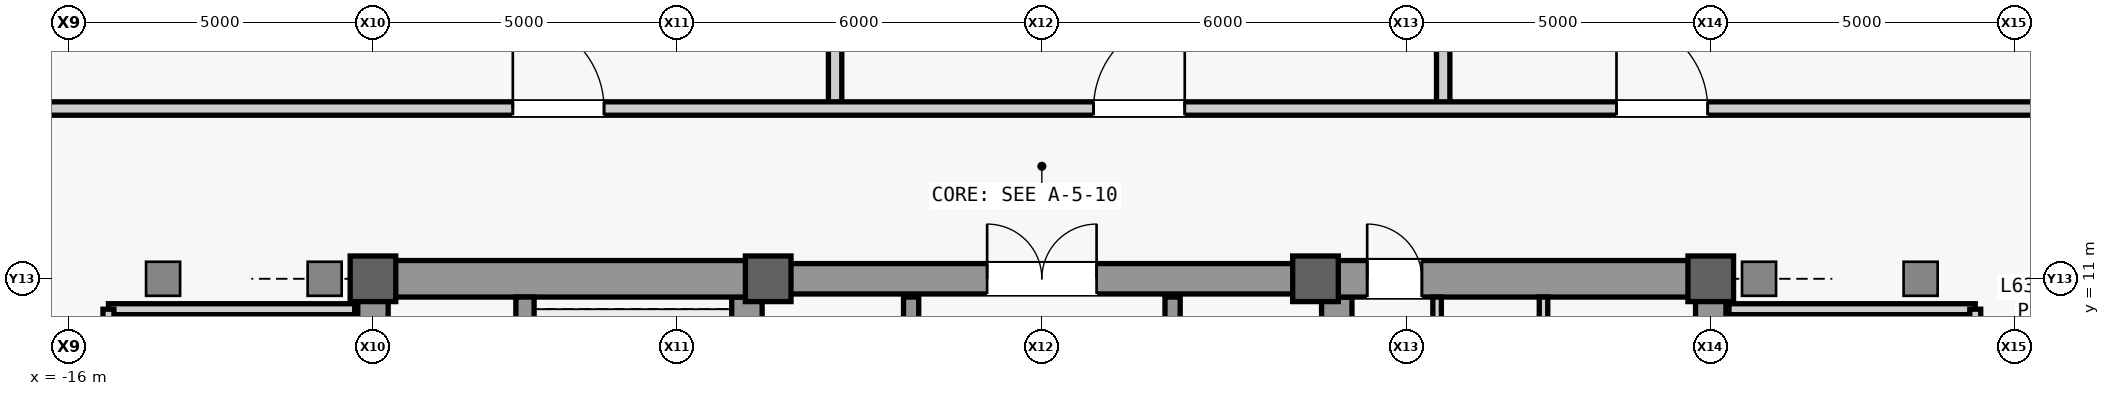
"""IFC4 building model, lengths in metres.
Left out: names, types, materials, properties, quantities, classifications, styles, units other than length and angle.
Written with IfcOpenShell. Run it as: python <this file> out.ifc"""

import sys

from ifc_helpers import new_model, si_unit, direction, frame, frame_2d, origin, origin_2d, place, context, subcontext, project, spatial, rectangle, extrude, source, transform, mapped, element, fill, save


model = new_model("IFC4")
c1 = context("Model", 3, precision=1e-05, world=origin(), true_north=direction((0.0, 1.0)))
c2 = subcontext(c1, "Body", "Model", "MODEL_VIEW")
j1 = project(units=[si_unit("LENGTHUNIT", "METRE"), si_unit("PLANEANGLEUNIT", "RADIAN")], contexts=[c1])
p1 = place(None, origin())
s1 = spatial("IfcSite", under=j1, at=p1, CompositionType="ELEMENT")
p2 = place(p1, origin())
s2 = spatial("IfcBuilding", under=s1, at=p2, CompositionType="ELEMENT")
p3 = place(p2, frame((0.0, 0.0, 268.3)))
s3 = spatial("IfcBuildingStorey", under=s2, at=p3, CompositionType="ELEMENT", Elevation=268.3)
m1 = source(origin(), c2, "Body", "SweptSolid", [
    extrude(rectangle(XDim=22.0, YDim=0.5, at=frame_2d((11.0, 0.0))), origin(), (0.0, 0.0, 1.0), 4.98),
])
p4 = place(p3, frame((-11.0, -11.0, 0.0), z_axis=(0.0, 0.0, 1.0), x_axis=(0.0, 1.0, 0.0)))
e1 = element("IfcWall", 1, at=p4, inside=s3, PredefinedType="SHEAR", context=c2, shape_type="MappedRepresentation", body=[
    mapped(m1, transform((0.0, 0.0, 0.0), scale=1.0)),
])
m2 = source(origin(), c2, "Body", "SweptSolid", [
    extrude(rectangle(XDim=1.1, YDim=2.2, at=frame_2d((0.55, 1.1))), frame((0.0, 0.26, 0.0), z_axis=(0.0, -1.0, 0.0), x_axis=(1.0, 0.0, 0.0)), (0.0, 0.0, 1.0), 0.52),
])
p5 = place(p4, frame((0.8, 0.0, 0.0)))
e2 = element("IfcOpeningElement", 2, at=p5, cuts=e1, PredefinedType="OPENING", context=c2, shape_type="MappedRepresentation", body=[
    mapped(m2, transform((0.0, 0.0, 0.0), scale=1.0)),
])
p6 = place(p4, frame((12.5, 0.0, 0.0)))
e3 = element("IfcOpeningElement", 3, at=p6, cuts=e1, PredefinedType="OPENING", context=c2, shape_type="MappedRepresentation", body=[
    mapped(m2, transform((0.0, 0.0, 0.0), scale=1.0)),
])
m3 = source(origin(), c2, "Body", "SweptSolid", [
    extrude(rectangle(XDim=0.9, YDim=2.15, at=frame_2d((0.45, 1.075))), frame((0.0, 0.26, 0.0), z_axis=(0.0, -1.0, 0.0), x_axis=(1.0, 0.0, 0.0)), (0.0, 0.0, 1.0), 0.52),
])
p7 = place(p4, frame((7.575, 0.0, 0.0)))
e4 = element("IfcOpeningElement", 4, at=p7, cuts=e1, PredefinedType="OPENING", context=c2, shape_type="MappedRepresentation", body=[
    mapped(m3, transform((0.0, 0.0, 0.0), scale=1.0)),
])
m4 = source(origin(), c2, "Body", "SweptSolid", [
    extrude(rectangle(XDim=1.3, YDim=2.3, at=frame_2d((0.65, 1.15))), frame((0.0, 0.26, 0.0), z_axis=(0.0, -1.0, 0.0), x_axis=(1.0, 0.0, 0.0)), (0.0, 0.0, 1.0), 0.52),
])
p8 = place(p4, frame((2.7, 0.0, 0.0)))
e5 = element("IfcOpeningElement", 5, at=p8, cuts=e1, PredefinedType="OPENING", context=c2, shape_type="MappedRepresentation", body=[
    mapped(m4, transform((0.0, 0.0, 0.0), scale=1.0)),
])
p9 = place(p3, frame((11.0, -11.0, 0.0), z_axis=(0.0, 0.0, 1.0), x_axis=(0.0, 1.0, 0.0)))
e6 = element("IfcWall", 6, at=p9, inside=s3, PredefinedType="SHEAR", context=c2, shape_type="MappedRepresentation", body=[
    mapped(m1, transform((0.0, 0.0, 0.0), scale=1.0)),
])
p10 = place(p9, frame((0.8, 0.0, 0.0)))
e7 = element("IfcOpeningElement", 7, at=p10, cuts=e6, PredefinedType="OPENING", context=c2, shape_type="MappedRepresentation", body=[
    mapped(m2, transform((0.0, 0.0, 0.0), scale=1.0)),
])
p11 = place(p9, frame((7.575, 0.0, 0.0)))
e8 = element("IfcOpeningElement", 8, at=p11, cuts=e6, PredefinedType="OPENING", context=c2, shape_type="MappedRepresentation", body=[
    mapped(m3, transform((0.0, 0.0, 0.0), scale=1.0)),
])
p12 = place(p9, frame((2.7, 0.0, 0.0)))
e9 = element("IfcOpeningElement", 9, at=p12, cuts=e6, PredefinedType="OPENING", context=c2, shape_type="MappedRepresentation", body=[
    mapped(m4, transform((0.0, 0.0, 0.0), scale=1.0)),
])
p13 = place(p9, frame((13.35, 0.0, 0.0)))
e10 = element("IfcOpeningElement", 10, at=p13, cuts=e6, PredefinedType="OPENING", context=c2, shape_type="MappedRepresentation", body=[
    mapped(m4, transform((0.0, 0.0, 0.0), scale=1.0)),
])
m5 = source(origin(), c2, "Body", "SweptSolid", [
    extrude(rectangle(XDim=21.4, YDim=0.5, at=frame_2d((10.7, 0.0))), origin(), (0.0, 0.0, 1.0), 4.98),
])
for number, where, z_axis, x_axis in (
    (11, (-4.85, -10.7, 0.0), (0.0, 0.0, 1.0), (0.0, 1.0, 0.0)),
    (12, (4.85, -10.7, 0.0), (0.0, 0.0, 1.0), (0.0, 1.0, 0.0)),
):
    element("IfcWall", number, at=place(p3, frame(where, z_axis=z_axis, x_axis=x_axis)), inside=s3, PredefinedType="SHEAR", context=c2, shape_type="MappedRepresentation", body=[
        mapped(m5, transform((0.0, 0.0, 0.0), scale=1.0)),
    ])
m6 = source(origin(), c2, "Body", "SweptSolid", [
    extrude(rectangle(XDim=5.9, YDim=0.6, at=frame_2d((2.95, 0.0))), origin(), (0.0, 0.0, 1.0), 4.98),
])
p14 = place(p3, frame((-10.75, 11.0, 0.0), z_axis=(0.0, 0.0, 1.0), x_axis=(1.0, 0.0, 0.0)))
e13 = element("IfcWall", 13, at=p14, inside=s3, PredefinedType="SHEAR", context=c2, shape_type="MappedRepresentation", body=[
    mapped(m6, transform((0.0, 0.0, 0.0), scale=1.0)),
])
p15 = place(p3, frame((4.85, 11.0, 0.0), z_axis=(0.0, 0.0, 1.0), x_axis=(1.0, 0.0, 0.0)))
e14 = element("IfcWall", 14, at=p15, inside=s3, PredefinedType="SHEAR", context=c2, shape_type="MappedRepresentation", body=[
    mapped(m6, transform((0.0, 0.0, 0.0), scale=1.0)),
])
m7 = source(origin(), c2, "Body", "SweptSolid", [
    extrude(rectangle(XDim=0.9, YDim=2.15, at=frame_2d((0.45, 1.075))), frame((0.0, 0.31, 0.0), z_axis=(0.0, -1.0, 0.0), x_axis=(1.0, 0.0, 0.0)), (0.0, 0.0, 1.0), 0.62),
])
p16 = place(p15, frame((0.5, 0.0, 0.0)))
e15 = element("IfcOpeningElement", 15, at=p16, cuts=e14, PredefinedType="OPENING", context=c2, shape_type="MappedRepresentation", body=[
    mapped(m7, transform((0.0, 0.0, 0.0), scale=1.0)),
])
m8 = source(origin(), c2, "Body", "SweptSolid", [
    extrude(rectangle(XDim=9.2, YDim=0.5, at=frame_2d((4.6, 0.0))), origin(), (0.0, 0.0, 1.0), 4.98),
])
p17 = place(p3, frame((-4.6, 11.0, 0.0), z_axis=(0.0, 0.0, 1.0), x_axis=(1.0, 0.0, 0.0)))
e16 = element("IfcWall", 16, at=p17, inside=s3, PredefinedType="SHEAR", context=c2, shape_type="MappedRepresentation", body=[
    mapped(m8, transform((0.0, 0.0, 0.0), scale=1.0)),
])
m9 = source(origin(), c2, "Body", "SweptSolid", [
    extrude(rectangle(XDim=1.8, YDim=2.25, at=frame_2d((0.9, 1.125))), frame((0.0, 0.26, 0.0), z_axis=(0.0, -1.0, 0.0), x_axis=(1.0, 0.0, 0.0)), (0.0, 0.0, 1.0), 0.52),
])
p18 = place(p17, frame((3.7, 0.0, 0.0)))
e17 = element("IfcOpeningElement", 17, at=p18, cuts=e16, PredefinedType="OPENING", context=c2, shape_type="MappedRepresentation", body=[
    mapped(m9, transform((0.0, 0.0, 0.0), scale=1.0)),
])
m10 = source(origin(), c2, "Body", "SweptSolid", [
    extrude(rectangle(XDim=0.75, YDim=0.75, at=origin_2d()), origin(), (0.0, 0.0, 1.0), 5.2),
])
for number, where, z_axis, x_axis in (
    (18, (-11.0, 11.0, 0.0), (0.0, 0.0, 1.0), (1.0, 0.0, 0.0)),
    (19, (-4.5, 11.0, 0.0), (0.0, 0.0, 1.0), (1.0, 0.0, 0.0)),
    (20, (4.5, 11.0, 0.0), (0.0, 0.0, 1.0), (1.0, 0.0, 0.0)),
    (21, (11.0, 11.0, 0.0), (0.0, 0.0, 1.0), (1.0, 0.0, 0.0)),
):
    element("IfcColumn", number, at=place(p3, frame(where, z_axis=z_axis, x_axis=x_axis)), inside=s3, PredefinedType="COLUMN", context=c2, shape_type="MappedRepresentation", body=[
        mapped(m10, transform((0.0, 0.0, 0.0), scale=1.0)),
    ])
m11 = source(origin(), c2, "Body", "SweptSolid", [
    extrude(rectangle(XDim=7.75, YDim=0.3, at=frame_2d((3.875, 0.0))), origin(), (0.0, 0.0, 1.0), 4.98),
])
p19 = place(p3, frame((-8.5, 2.95, 0.0), z_axis=(0.0, 0.0, 1.0), x_axis=(0.0, 1.0, 0.0)))
e22 = element("IfcWall", 22, at=p19, inside=s3, PredefinedType="SHEAR", context=c2, shape_type="MappedRepresentation", body=[
    mapped(m11, transform((0.0, 0.0, 0.0), scale=1.0)),
])
m12 = source(origin(), c2, "Body", "SweptSolid", [
    extrude(rectangle(XDim=9.4, YDim=0.14, at=frame_2d((4.7, 0.0))), origin(), (0.0, 0.0, 1.0), 4.98),
])
p20 = place(p3, frame((8.25, 1.3, 0.0), z_axis=(0.0, 0.0, 1.0), x_axis=(0.0, 1.0, 0.0)))
e23 = element("IfcWall", 23, at=p20, inside=s3, PredefinedType="PARTITIONING", context=c2, shape_type="MappedRepresentation", body=[
    mapped(m12, transform((0.0, 0.0, 0.0), scale=1.0)),
])
m13 = source(origin(), c2, "Body", "SweptSolid", [
    extrude(rectangle(XDim=5.7, YDim=0.14, at=frame_2d((2.85, 0.0))), origin(), (0.0, 0.0, 1.0), 4.98),
])
p21 = place(p3, frame((6.5, 5.0, 0.0), z_axis=(0.0, 0.0, 1.0), x_axis=(0.0, 1.0, 0.0)))
e24 = element("IfcWall", 24, at=p21, inside=s3, PredefinedType="PARTITIONING", context=c2, shape_type="MappedRepresentation", body=[
    mapped(m13, transform((0.0, 0.0, 0.0), scale=1.0)),
])
m14 = source(origin(), c2, "Body", "SweptSolid", [
    extrude(rectangle(XDim=0.9, YDim=2.15, at=frame_2d((0.45, 1.075))), frame((0.0, 0.08, 0.0), z_axis=(0.0, -1.0, 0.0), x_axis=(1.0, 0.0, 0.0)), (0.0, 0.0, 1.0), 0.16),
])
p22 = place(p21, frame((2.05, 0.0, 0.0)))
e25 = element("IfcOpeningElement", 25, at=p22, cuts=e24, PredefinedType="OPENING", context=c2, shape_type="MappedRepresentation", body=[
    mapped(m14, transform((0.0, 0.0, 0.0), scale=1.0)),
])
m15 = source(origin(), c2, "Body", "SweptSolid", [
    extrude(rectangle(XDim=4.05, YDim=0.18, at=frame_2d((2.025, 0.0))), origin(), (0.0, 0.0, 1.0), 4.98),
])
p23 = place(p3, frame((-15.35, 10.5, 0.0), z_axis=(0.0, 0.0, 1.0), x_axis=(1.0, 0.0, 0.0)))
e26 = element("IfcWall", 26, at=p23, inside=s3, PredefinedType="PARTITIONING", context=c2, shape_type="MappedRepresentation", body=[
    mapped(m15, transform((0.0, 0.0, 0.0), scale=1.0)),
])
m16 = source(origin(), c2, "Body", "SweptSolid", [
    extrude(rectangle(XDim=16.6, YDim=0.18, at=frame_2d((8.3, 0.0))), origin(), (0.0, 0.0, 1.0), 4.98),
])
p24 = place(p3, frame((-15.35, -6.1, 0.0), z_axis=(0.0, 0.0, 1.0), x_axis=(0.0, 1.0, 0.0)))
e27 = element("IfcWall", 27, at=p24, inside=s3, PredefinedType="PARTITIONING", context=c2, shape_type="MappedRepresentation", body=[
    mapped(m16, transform((0.0, 0.0, 0.0), scale=1.0)),
])
m17 = source(origin(), c2, "Body", "SweptSolid", [
    extrude(rectangle(XDim=1.8, YDim=2.25, at=frame_2d((0.9, 1.125))), frame((0.0, 0.1, 0.0), z_axis=(0.0, -1.0, 0.0), x_axis=(1.0, 0.0, 0.0)), (0.0, 0.0, 1.0), 0.2),
])
p25 = place(p24, frame((2.7, 0.0, 0.0)))
e28 = element("IfcOpeningElement", 28, at=p25, cuts=e27, PredefinedType="OPENING", context=c2, shape_type="MappedRepresentation", body=[
    mapped(m17, transform((0.0, 0.0, 0.0), scale=1.0)),
])
p26 = place(p24, frame((11.0, 0.0, 0.0)))
e29 = element("IfcOpeningElement", 29, at=p26, cuts=e27, PredefinedType="OPENING", context=c2, shape_type="MappedRepresentation", body=[
    mapped(m17, transform((0.0, 0.0, 0.0), scale=1.0)),
])
p27 = place(p3, frame((11.3, 10.5, 0.0), z_axis=(0.0, 0.0, 1.0), x_axis=(1.0, 0.0, 0.0)))
e30 = element("IfcWall", 30, at=p27, inside=s3, PredefinedType="PARTITIONING", context=c2, shape_type="MappedRepresentation", body=[
    mapped(m15, transform((0.0, 0.0, 0.0), scale=1.0)),
])
p28 = place(p3, frame((15.35, -6.1, 0.0), z_axis=(0.0, 0.0, 1.0), x_axis=(0.0, 1.0, 0.0)))
e31 = element("IfcWall", 31, at=p28, inside=s3, PredefinedType="PARTITIONING", context=c2, shape_type="MappedRepresentation", body=[
    mapped(m16, transform((0.0, 0.0, 0.0), scale=1.0)),
])
p29 = place(p28, frame((2.7, 0.0, 0.0)))
e32 = element("IfcOpeningElement", 32, at=p29, cuts=e31, PredefinedType="OPENING", context=c2, shape_type="MappedRepresentation", body=[
    mapped(m17, transform((0.0, 0.0, 0.0), scale=1.0)),
])
p30 = place(p28, frame((13.0, 0.0, 0.0)))
e33 = element("IfcOpeningElement", 33, at=p30, cuts=e31, PredefinedType="OPENING", context=c2, shape_type="MappedRepresentation", body=[
    mapped(m17, transform((0.0, 0.0, 0.0), scale=1.0)),
])
m18 = source(origin(), c2, "Body", "SweptSolid", [
    extrude(rectangle(XDim=5.4, YDim=0.25, at=frame_2d((2.7, 0.0))), origin(), (0.0, 0.0, 1.0), 4.98),
])
for number, where, z_axis, x_axis in (
    (34, (-2.15, 5.3, 0.0), (0.0, 0.0, 1.0), (0.0, 1.0, 0.0)),
    (35, (2.15, 5.3, 0.0), (0.0, 0.0, 1.0), (0.0, 1.0, 0.0)),
):
    element("IfcWall", number, at=place(p3, frame(where, z_axis=z_axis, x_axis=x_axis)), inside=s3, PredefinedType="SHEAR", context=c2, shape_type="MappedRepresentation", body=[
        mapped(m18, transform((0.0, 0.0, 0.0), scale=1.0)),
    ])
m19 = source(origin(), c2, "Body", "SweptSolid", [
    extrude(rectangle(XDim=14.2, YDim=0.22, at=frame_2d((7.1, 0.0))), origin(), (0.0, 0.0, 1.0), 4.98),
])
for number, where, z_axis, x_axis in (
    (36, (-3.4, 13.8, 0.0), (0.0, 0.0, 1.0), (0.0, 1.0, 0.0)),
    (37, (6.6, 13.8, 0.0), (0.0, 0.0, 1.0), (0.0, 1.0, 0.0)),
):
    element("IfcWall", number, at=place(p3, frame(where, z_axis=z_axis, x_axis=x_axis)), inside=s3, PredefinedType="PARTITIONING", context=c2, shape_type="MappedRepresentation", body=[
        mapped(m19, transform((0.0, 0.0, 0.0), scale=1.0)),
    ])
m20 = source(origin(), c2, "Body", "SweptSolid", [
    extrude(rectangle(XDim=45.0, YDim=0.22, at=frame_2d((22.5, 0.0))), origin(), (0.0, 0.0, 1.0), 4.98),
])
p31 = place(p3, frame((-22.5, 13.8, 0.0), z_axis=(0.0, 0.0, 1.0), x_axis=(1.0, 0.0, 0.0)))
e38 = element("IfcWall", 38, at=p31, inside=s3, PredefinedType="PARTITIONING", context=c2, shape_type="MappedRepresentation", body=[
    mapped(m20, transform((0.0, 0.0, 0.0), scale=1.0)),
])
m21 = source(origin(), c2, "Body", "SweptSolid", [
    extrude(rectangle(XDim=1.5, YDim=2.3, at=frame_2d((0.75, 1.15))), frame((0.0, 0.12, 0.0), z_axis=(0.0, -1.0, 0.0), x_axis=(1.0, 0.0, 0.0)), (0.0, 0.0, 1.0), 0.24),
])
p32 = place(p31, frame((13.8, 0.0, 0.0)))
e39 = element("IfcOpeningElement", 39, at=p32, cuts=e38, PredefinedType="OPENING", context=c2, shape_type="MappedRepresentation", body=[
    mapped(m21, transform((0.0, 0.0, 0.0), scale=1.0)),
])
p33 = place(p31, frame((23.35, 0.0, 0.0)))
e40 = element("IfcOpeningElement", 40, at=p33, cuts=e38, PredefinedType="OPENING", context=c2, shape_type="MappedRepresentation", body=[
    mapped(m21, transform((0.0, 0.0, 0.0), scale=1.0)),
])
p34 = place(p31, frame((31.95, 0.0, 0.0)))
e41 = element("IfcOpeningElement", 41, at=p34, cuts=e38, PredefinedType="OPENING", context=c2, shape_type="MappedRepresentation", body=[
    mapped(m21, transform((0.0, 0.0, 0.0), scale=1.0)),
])
m22 = source(origin(), c2, "Body", "SweptSolid", [
    extrude(rectangle(XDim=0.9, YDim=2.15, at=frame_2d((0.45, 1.075))), frame((0.0, 0.025, 0.0), z_axis=(0.0, -1.0, 0.0), x_axis=(1.0, 0.0, 0.0)), (0.0, 0.0, 1.0), 0.05),
])
p35 = place(p16, origin())
e42 = element("IfcDoor", 42, at=p35, inside=s3, OperationType="SINGLE_SWING_LEFT", PredefinedType="DOOR", context=c2, shape_type="MappedRepresentation", body=[
    mapped(m22, transform((0.0, 0.0, 0.0), scale=1.0)),
])
fill(e15, e42)
m23 = source(origin(), c2, "Body", "SweptSolid", [
    extrude(rectangle(XDim=1.8, YDim=2.25, at=frame_2d((0.9, 1.125))), frame((0.0, 0.025, 0.0), z_axis=(0.0, -1.0, 0.0), x_axis=(1.0, 0.0, 0.0)), (0.0, 0.0, 1.0), 0.05),
])
p36 = place(p18, origin())
e43 = element("IfcDoor", 43, at=p36, inside=s3, OperationType="SINGLE_SWING_RIGHT", PredefinedType="DOOR", context=c2, shape_type="MappedRepresentation", body=[
    mapped(m23, transform((0.0, 0.0, 0.0), scale=1.0)),
])
fill(e17, e43)
m24 = source(origin(), c2, "Body", "SweptSolid", [
    extrude(rectangle(XDim=1.5, YDim=2.3, at=frame_2d((0.75, 1.15))), frame((0.0, 0.025, 0.0), z_axis=(0.0, -1.0, 0.0), x_axis=(1.0, 0.0, 0.0)), (0.0, 0.0, 1.0), 0.05),
])
p37 = place(p32, origin())
e44 = element("IfcDoor", 44, at=p37, inside=s3, OperationType="SINGLE_SWING_LEFT", PredefinedType="DOOR", context=c2, shape_type="MappedRepresentation", body=[
    mapped(m24, transform((0.0, 0.0, 0.0), scale=1.0)),
])
fill(e39, e44)
p38 = place(p33, origin())
e45 = element("IfcDoor", 45, at=p38, inside=s3, OperationType="SINGLE_SWING_RIGHT", PredefinedType="DOOR", context=c2, shape_type="MappedRepresentation", body=[
    mapped(m24, transform((0.0, 0.0, 0.0), scale=1.0)),
])
fill(e40, e45)
p39 = place(p34, origin())
e46 = element("IfcDoor", 46, at=p39, inside=s3, OperationType="SINGLE_SWING_LEFT", PredefinedType="DOOR", context=c2, shape_type="MappedRepresentation", body=[
    mapped(m24, transform((0.0, 0.0, 0.0), scale=1.0)),
])
fill(e41, e46)
save(model, sys.argv[1])
